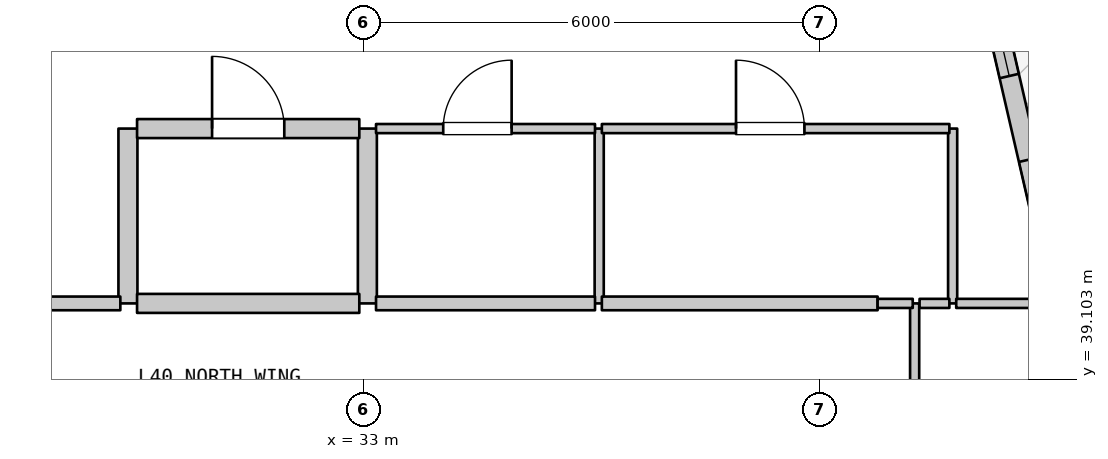
"""IFC4 building model, lengths in metres.
Left out: names, types, materials, properties, quantities, classifications, styles, units other than length and angle.
Written with IfcOpenShell. Run it as: python <this file> out.ifc"""

import sys

from ifc_helpers import new_model, si_unit, direction, frame, frame_2d, origin, place, context, subcontext, project, spatial, rectangle, extrude, element, fill, save


model = new_model("IFC4")
c1 = context("Model", 3, precision=1e-05, world=origin(), true_north=direction((0.0, 1.0)))
c2 = subcontext(c1, "Body", "Model", "MODEL_VIEW")
j1 = project(units=[si_unit("LENGTHUNIT", "METRE"), si_unit("PLANEANGLEUNIT", "RADIAN")], contexts=[c1])
p1 = place(None, origin())
s1 = spatial("IfcSite", under=j1, at=p1, CompositionType="ELEMENT")
p2 = place(p1, origin())
s2 = spatial("IfcBuilding", under=s1, at=p2, CompositionType="ELEMENT")
p3 = place(p2, frame((0.0, 0.0, 164.6)))
s3 = spatial("IfcBuildingStorey", under=s2, at=p3, CompositionType="ELEMENT", Elevation=164.6)
p4 = place(p3, frame((39.358, 52.35, 0.0), z_axis=(0.0, 0.0, 1.0), x_axis=(0.224849558511, -0.974393491377, 0.0)))
e1 = element("IfcWall", 1, at=p4, inside=s3, PredefinedType="STANDARD", context=c2, shape_type="SweptSolid", body=[
    extrude(rectangle(XDim=25.093, YDim=0.26, at=frame_2d((12.546, 0.0))), origin(), (0.0, 0.0, 1.0), 4.19),
])
p5 = place(p4, frame((16.689, 0.0, 0.0)))
e2 = element("IfcOpeningElement", 2, at=p5, cuts=e1, PredefinedType="OPENING", context=c2, shape_type="SweptSolid", body=[
    extrude(rectangle(XDim=1.4, YDim=2.2, at=frame_2d((0.7, 1.1))), frame((0.0, 0.14, 0.0), z_axis=(0.0, -1.0, 0.0), x_axis=(1.0, 0.0, 0.0)), (0.0, 0.0, 1.0), 0.28),
])
p6 = place(p4, frame((0.915, 0.0, 0.9)))
e3 = element("IfcOpeningElement", 3, at=p6, cuts=e1, PredefinedType="OPENING", context=c2, shape_type="SweptSolid", body=[
    extrude(rectangle(XDim=1.4, YDim=1.85, at=frame_2d((0.7, 0.925))), frame((0.0, 0.14, 0.0), z_axis=(0.0, -1.0, 0.0), x_axis=(1.0, 0.0, 0.0)), (0.0, 0.0, 1.0), 0.28),
])
p7 = place(p4, frame((3.344, 0.0, 0.9)))
e4 = element("IfcOpeningElement", 4, at=p7, cuts=e1, PredefinedType="OPENING", context=c2, shape_type="SweptSolid", body=[
    extrude(rectangle(XDim=1.3, YDim=1.9, at=frame_2d((0.65, 0.95))), frame((0.0, 0.14, 0.0), z_axis=(0.0, -1.0, 0.0), x_axis=(1.0, 0.0, 0.0)), (0.0, 0.0, 1.0), 0.28),
])
p8 = place(p4, frame((5.323, 0.0, 0.9)))
e5 = element("IfcOpeningElement", 5, at=p8, cuts=e1, PredefinedType="OPENING", context=c2, shape_type="SweptSolid", body=[
    extrude(rectangle(XDim=1.4, YDim=1.85, at=frame_2d((0.7, 0.925))), frame((0.0, 0.14, 0.0), z_axis=(0.0, -1.0, 0.0), x_axis=(1.0, 0.0, 0.0)), (0.0, 0.0, 1.0), 0.28),
])
p9 = place(p4, frame((8.202, 0.0, 0.9)))
e6 = element("IfcOpeningElement", 6, at=p9, cuts=e1, PredefinedType="OPENING", context=c2, shape_type="SweptSolid", body=[
    extrude(rectangle(XDim=1.3, YDim=1.9, at=frame_2d((0.65, 0.95))), frame((0.0, 0.14, 0.0), z_axis=(0.0, -1.0, 0.0), x_axis=(1.0, 0.0, 0.0)), (0.0, 0.0, 1.0), 0.28),
])
p10 = place(p4, frame((10.632, 0.0, 0.9)))
e7 = element("IfcOpeningElement", 7, at=p10, cuts=e1, PredefinedType="OPENING", context=c2, shape_type="SweptSolid", body=[
    extrude(rectangle(XDim=1.4, YDim=1.85, at=frame_2d((0.7, 0.925))), frame((0.0, 0.14, 0.0), z_axis=(0.0, -1.0, 0.0), x_axis=(1.0, 0.0, 0.0)), (0.0, 0.0, 1.0), 0.28),
])
p11 = place(p4, frame((13.061, 0.0, 0.9)))
e8 = element("IfcOpeningElement", 8, at=p11, cuts=e1, PredefinedType="OPENING", context=c2, shape_type="SweptSolid", body=[
    extrude(rectangle(XDim=1.3, YDim=1.9, at=frame_2d((0.65, 0.95))), frame((0.0, 0.14, 0.0), z_axis=(0.0, -1.0, 0.0), x_axis=(1.0, 0.0, 0.0)), (0.0, 0.0, 1.0), 0.28),
])
p12 = place(p4, frame((18.369, 0.0, 0.9)))
e9 = element("IfcOpeningElement", 9, at=p12, cuts=e1, PredefinedType="OPENING", context=c2, shape_type="SweptSolid", body=[
    extrude(rectangle(XDim=1.4, YDim=1.85, at=frame_2d((0.7, 0.925))), frame((0.0, 0.14, 0.0), z_axis=(0.0, -1.0, 0.0), x_axis=(1.0, 0.0, 0.0)), (0.0, 0.0, 1.0), 0.28),
])
p13 = place(p4, frame((20.799, 0.0, 0.9)))
e10 = element("IfcOpeningElement", 10, at=p13, cuts=e1, PredefinedType="OPENING", context=c2, shape_type="SweptSolid", body=[
    extrude(rectangle(XDim=1.3, YDim=1.9, at=frame_2d((0.65, 0.95))), frame((0.0, 0.14, 0.0), z_axis=(0.0, -1.0, 0.0), x_axis=(1.0, 0.0, 0.0)), (0.0, 0.0, 1.0), 0.28),
])
p14 = place(p3, frame((29.9, 40.1, 0.0), z_axis=(0.0, 0.0, 1.0), x_axis=(0.0, 1.0, 0.0)))
e11 = element("IfcWall", 11, at=p14, inside=s3, PredefinedType="STANDARD", context=c2, shape_type="SweptSolid", body=[
    extrude(rectangle(XDim=2.3, YDim=0.25, at=frame_2d((1.15, 0.0))), origin(), (0.0, 0.0, 1.0), 4.19),
])
p15 = place(p3, frame((33.05, 40.1, 0.0), z_axis=(0.0, 0.0, 1.0), x_axis=(0.0, 1.0, 0.0)))
e12 = element("IfcWall", 12, at=p15, inside=s3, PredefinedType="STANDARD", context=c2, shape_type="SweptSolid", body=[
    extrude(rectangle(XDim=2.3, YDim=0.25, at=frame_2d((1.15, 0.0))), origin(), (0.0, 0.0, 1.0), 3.59),
])
p16 = place(p3, frame((36.1, 40.1, 0.0), z_axis=(0.0, 0.0, 1.0), x_axis=(0.0, 1.0, 0.0)))
e13 = element("IfcWall", 13, at=p16, inside=s3, PredefinedType="PARTITIONING", context=c2, shape_type="SweptSolid", body=[
    extrude(rectangle(XDim=2.3, YDim=0.12, at=frame_2d((1.15, 0.0))), origin(), (0.0, 0.0, 1.0), 4.19),
])
p17 = place(p3, frame((40.25, 37.9, 0.0), z_axis=(0.0, 0.0, 1.0), x_axis=(0.0, 1.0, 0.0)))
e14 = element("IfcWall", 14, at=p17, inside=s3, PredefinedType="PARTITIONING", context=c2, shape_type="SweptSolid", body=[
    extrude(rectangle(XDim=2.2, YDim=0.12, at=frame_2d((1.1, 0.0))), origin(), (0.0, 0.0, 1.0), 4.19),
])
p18 = place(p3, frame((40.75, 40.1, 0.0), z_axis=(0.0, 0.0, 1.0), x_axis=(0.0, 1.0, 0.0)))
e15 = element("IfcWall", 15, at=p18, inside=s3, PredefinedType="PARTITIONING", context=c2, shape_type="SweptSolid", body=[
    extrude(rectangle(XDim=2.3, YDim=0.12, at=frame_2d((1.15, 0.0))), origin(), (0.0, 0.0, 1.0), 4.19),
])
p19 = place(p3, frame((19.455, 40.1, 0.0), z_axis=(0.0, 0.0, 1.0), x_axis=(1.0, 0.0, 0.0)))
e16 = element("IfcWall", 16, at=p19, inside=s3, PredefinedType="STANDARD", context=c2, shape_type="SweptSolid", body=[
    extrude(rectangle(XDim=10.345, YDim=0.18, at=frame_2d((5.172, 0.0))), origin(), (0.0, 0.0, 1.0), 4.19),
])
p20 = place(p19, frame((2.035, 0.0, 0.0)))
e17 = element("IfcOpeningElement", 17, at=p20, cuts=e16, PredefinedType="OPENING", context=c2, shape_type="SweptSolid", body=[
    extrude(rectangle(XDim=1.0, YDim=2.15, at=frame_2d((0.5, 1.075))), frame((0.0, 0.1, 0.0), z_axis=(0.0, -1.0, 0.0), x_axis=(1.0, 0.0, 0.0)), (0.0, 0.0, 1.0), 0.2),
])
p21 = place(p19, frame((7.235, 0.0, 0.0)))
e18 = element("IfcOpeningElement", 18, at=p21, cuts=e16, PredefinedType="OPENING", context=c2, shape_type="SweptSolid", body=[
    extrude(rectangle(XDim=1.0, YDim=2.15, at=frame_2d((0.5, 1.075))), frame((0.0, 0.1, 0.0), z_axis=(0.0, -1.0, 0.0), x_axis=(1.0, 0.0, 0.0)), (0.0, 0.0, 1.0), 0.2),
])
p22 = place(p3, frame((30.02, 40.1, 0.0), z_axis=(0.0, 0.0, 1.0), x_axis=(1.0, 0.0, 0.0)))
e19 = element("IfcWall", 19, at=p22, inside=s3, PredefinedType="STANDARD", context=c2, shape_type="SweptSolid", body=[
    extrude(rectangle(XDim=2.924, YDim=0.25, at=frame_2d((1.462, 0.0))), origin(), (0.0, 0.0, 1.0), 4.19),
])
p23 = place(p3, frame((33.164, 40.1, 0.0), z_axis=(0.0, 0.0, 1.0), x_axis=(1.0, 0.0, 0.0)))
e20 = element("IfcWall", 20, at=p23, inside=s3, PredefinedType="STANDARD", context=c2, shape_type="SweptSolid", body=[
    extrude(rectangle(XDim=2.881, YDim=0.18, at=frame_2d((1.44, 0.0))), origin(), (0.0, 0.0, 1.0), 4.19),
])
p24 = place(p3, frame((36.135, 40.1, 0.0), z_axis=(0.0, 0.0, 1.0), x_axis=(1.0, 0.0, 0.0)))
e21 = element("IfcWall", 21, at=p24, inside=s3, PredefinedType="STANDARD", context=c2, shape_type="SweptSolid", body=[
    extrude(rectangle(XDim=3.628, YDim=0.18, at=frame_2d((1.814, 0.0))), origin(), (0.0, 0.0, 1.0), 4.19),
])
p25 = place(p3, frame((39.763, 40.1, 0.0), z_axis=(0.0, 0.0, 1.0), x_axis=(1.0, 0.0, 0.0)))
e22 = element("IfcWall", 22, at=p25, inside=s3, PredefinedType="PARTITIONING", context=c2, shape_type="SweptSolid", body=[
    extrude(rectangle(XDim=0.462, YDim=0.12, at=frame_2d((0.231, 0.0))), origin(), (0.0, 0.0, 1.0), 4.19),
])
p26 = place(p3, frame((40.315, 40.1, 0.0), z_axis=(0.0, 0.0, 1.0), x_axis=(1.0, 0.0, 0.0)))
e23 = element("IfcWall", 23, at=p26, inside=s3, PredefinedType="PARTITIONING", context=c2, shape_type="SweptSolid", body=[
    extrude(rectangle(XDim=0.392, YDim=0.12, at=frame_2d((0.196, 0.0))), origin(), (0.0, 0.0, 1.0), 4.19),
])
p27 = place(p3, frame((40.797, 40.1, 0.0), z_axis=(0.0, 0.0, 1.0), x_axis=(1.0, 0.0, 0.0)))
e24 = element("IfcWall", 24, at=p27, inside=s3, PredefinedType="PARTITIONING", context=c2, shape_type="SweptSolid", body=[
    extrude(rectangle(XDim=1.378, YDim=0.12, at=frame_2d((0.689, 0.0))), origin(), (0.0, 0.0, 1.0), 4.19),
])
p28 = place(p3, frame((30.02, 42.4, 0.0), z_axis=(0.0, 0.0, 1.0), x_axis=(1.0, 0.0, 0.0)))
e25 = element("IfcWall", 25, at=p28, inside=s3, PredefinedType="STANDARD", context=c2, shape_type="SweptSolid", body=[
    extrude(rectangle(XDim=2.924, YDim=0.25, at=frame_2d((1.462, 0.0))), origin(), (0.0, 0.0, 1.0), 4.19),
])
p29 = place(p28, frame((0.987, 0.0, 0.0)))
e26 = element("IfcOpeningElement", 26, at=p29, cuts=e25, PredefinedType="OPENING", context=c2, shape_type="SweptSolid", body=[
    extrude(rectangle(XDim=0.95, YDim=2.15, at=frame_2d((0.475, 1.075))), frame((0.0, 0.135, 0.0), z_axis=(0.0, -1.0, 0.0), x_axis=(1.0, 0.0, 0.0)), (0.0, 0.0, 1.0), 0.27),
])
p30 = place(p3, frame((33.164, 42.4, 0.0), z_axis=(0.0, 0.0, 1.0), x_axis=(1.0, 0.0, 0.0)))
e27 = element("IfcWall", 27, at=p30, inside=s3, PredefinedType="PARTITIONING", context=c2, shape_type="SweptSolid", body=[
    extrude(rectangle(XDim=2.881, YDim=0.12, at=frame_2d((1.44, 0.0))), origin(), (0.0, 0.0, 1.0), 4.19),
])
p31 = place(p30, frame((0.884, 0.0, 0.0)))
e28 = element("IfcOpeningElement", 28, at=p31, cuts=e27, PredefinedType="OPENING", context=c2, shape_type="SweptSolid", body=[
    extrude(rectangle(XDim=0.9, YDim=2.1, at=frame_2d((0.45, 1.05))), frame((0.0, 0.07, 0.0), z_axis=(0.0, -1.0, 0.0), x_axis=(1.0, 0.0, 0.0)), (0.0, 0.0, 1.0), 0.14),
])
p32 = place(p3, frame((36.135, 42.4, 0.0), z_axis=(0.0, 0.0, 1.0), x_axis=(1.0, 0.0, 0.0)))
e29 = element("IfcWall", 29, at=p32, inside=s3, PredefinedType="PARTITIONING", context=c2, shape_type="SweptSolid", body=[
    extrude(rectangle(XDim=4.572, YDim=0.12, at=frame_2d((2.286, 0.0))), origin(), (0.0, 0.0, 1.0), 4.19),
])
p33 = place(p32, frame((1.765, 0.0, 0.0)))
e30 = element("IfcOpeningElement", 30, at=p33, cuts=e29, PredefinedType="OPENING", context=c2, shape_type="SweptSolid", body=[
    extrude(rectangle(XDim=0.9, YDim=2.15, at=frame_2d((0.45, 1.075))), frame((0.0, 0.07, 0.0), z_axis=(0.0, -1.0, 0.0), x_axis=(1.0, 0.0, 0.0)), (0.0, 0.0, 1.0), 0.14),
])
p34 = place(p9, origin())
e31 = element("IfcWindow", 31, at=p34, inside=s3, PartitioningType="SINGLE_PANEL", PredefinedType="WINDOW", context=c2, shape_type="SweptSolid", body=[
    extrude(rectangle(XDim=1.3, YDim=1.9, at=frame_2d((0.65, 0.95))), frame((0.0, 0.03, 0.0), z_axis=(0.0, -1.0, 0.0), x_axis=(1.0, 0.0, 0.0)), (0.0, 0.0, 1.0), 0.06),
])
fill(e6, e31)
p35 = place(p10, origin())
e32 = element("IfcWindow", 32, at=p35, inside=s3, PartitioningType="SINGLE_PANEL", PredefinedType="WINDOW", context=c2, shape_type="SweptSolid", body=[
    extrude(rectangle(XDim=1.4, YDim=1.85, at=frame_2d((0.7, 0.925))), frame((0.0, 0.03, 0.0), z_axis=(0.0, -1.0, 0.0), x_axis=(1.0, 0.0, 0.0)), (0.0, 0.0, 1.0), 0.06),
])
fill(e7, e32)
p36 = place(p29, origin())
e33 = element("IfcDoor", 33, at=p36, inside=s3, OperationType="SINGLE_SWING_LEFT", PredefinedType="DOOR", context=c2, shape_type="SweptSolid", body=[
    extrude(rectangle(XDim=0.95, YDim=2.15, at=frame_2d((0.475, 1.075))), frame((0.0, 0.025, 0.0), z_axis=(0.0, -1.0, 0.0), x_axis=(1.0, 0.0, 0.0)), (0.0, 0.0, 1.0), 0.05),
])
fill(e26, e33)
p37 = place(p31, origin())
e34 = element("IfcDoor", 34, at=p37, inside=s3, OperationType="SINGLE_SWING_RIGHT", PredefinedType="DOOR", context=c2, shape_type="SweptSolid", body=[
    extrude(rectangle(XDim=0.9, YDim=2.1, at=frame_2d((0.45, 1.05))), frame((0.0, 0.025, 0.0), z_axis=(0.0, -1.0, 0.0), x_axis=(1.0, 0.0, 0.0)), (0.0, 0.0, 1.0), 0.05),
])
fill(e28, e34)
p38 = place(p33, origin())
e35 = element("IfcDoor", 35, at=p38, inside=s3, OperationType="SINGLE_SWING_LEFT", PredefinedType="DOOR", context=c2, shape_type="SweptSolid", body=[
    extrude(rectangle(XDim=0.9, YDim=2.15, at=frame_2d((0.45, 1.075))), frame((0.0, 0.025, 0.0), z_axis=(0.0, -1.0, 0.0), x_axis=(1.0, 0.0, 0.0)), (0.0, 0.0, 1.0), 0.05),
])
fill(e30, e35)
save(model, sys.argv[1])
